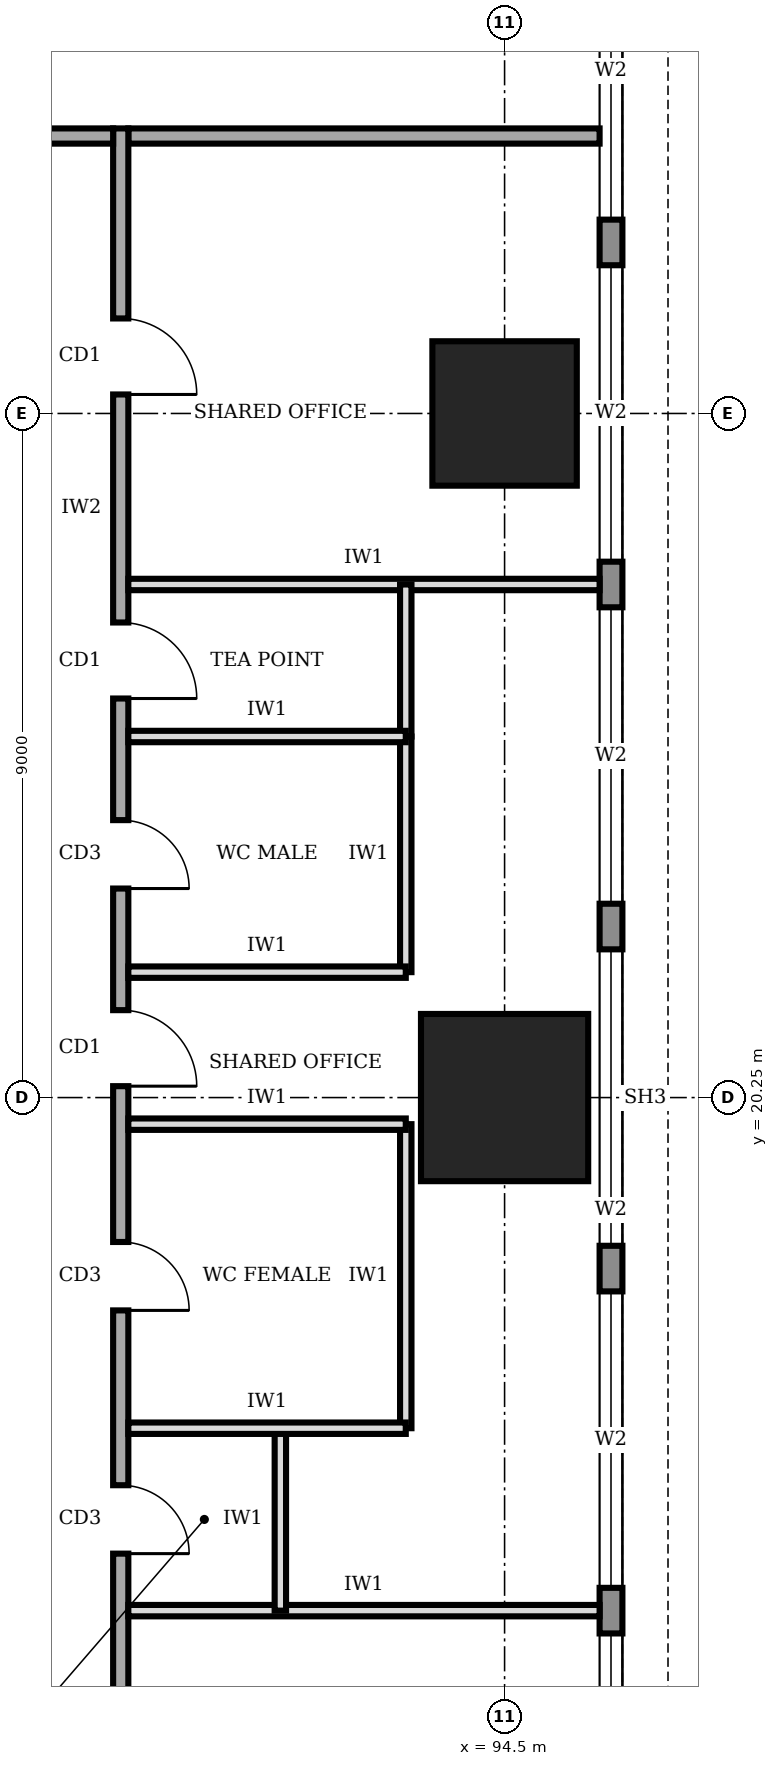
"""IFC4 building model, lengths in metres.
Left out: names, types, materials, properties, quantities, classifications, styles, units other than length and angle.
Written with IfcOpenShell. Run it as: python <this file> out.ifc"""

import sys

from ifc_helpers import new_model, si_unit, direction, frame, frame_2d, origin, origin_2d, place, context, subcontext, project, spatial, rectangle, extrude, element, fill, save


model = new_model("IFC4")
c1 = context("Model", 3, precision=1e-05, world=origin(), true_north=direction((0.0, 1.0)))
c2 = subcontext(c1, "Body", "Model", "MODEL_VIEW")
j1 = project(units=[si_unit("LENGTHUNIT", "METRE"), si_unit("PLANEANGLEUNIT", "RADIAN")], contexts=[c1])
p1 = place(None, origin())
s1 = spatial("IfcSite", under=j1, at=p1, CompositionType="ELEMENT")
p2 = place(p1, origin())
s2 = spatial("IfcBuilding", under=s1, at=p2, CompositionType="ELEMENT")
p3 = place(p2, frame((0.0, 0.0, 137.0)))
s3 = spatial("IfcBuildingStorey", under=s2, at=p3, CompositionType="ELEMENT", Elevation=137.0)
p4 = place(p3, frame((94.5, 20.25, 0.0), z_axis=(0.0, 0.0, 1.0), x_axis=(1.0, 0.0, 0.0)))
e1 = element("IfcColumn", 1, at=p4, inside=s3, PredefinedType="COLUMN", context=c2, shape_type="SweptSolid", body=[
    extrude(rectangle(XDim=2.2, YDim=2.2, at=origin_2d()), origin(), (0.0, 0.0, 1.0), 4.0),
])
p5 = place(p3, frame((94.5, 29.25, 0.0), z_axis=(0.0, 0.0, 1.0), x_axis=(1.0, 0.0, 0.0)))
e2 = element("IfcColumn", 2, at=p5, inside=s3, PredefinedType="COLUMN", context=c2, shape_type="SweptSolid", body=[
    extrude(rectangle(XDim=1.9, YDim=1.9, at=origin_2d()), origin(), (0.0, 0.0, 1.0), 4.0),
])
p6 = place(p3, frame((95.9, 3.32, 0.0), z_axis=(0.0, 0.0, 1.0), x_axis=(0.0, 1.0, 0.0)))
e3 = element("IfcWall", 3, at=p6, inside=s3, PredefinedType="STANDARD", context=c2, shape_type="SweptSolid", body=[
    extrude(rectangle(XDim=33.86, YDim=0.3, at=frame_2d((16.93, 0.0))), origin(), (0.0, 0.0, 1.0), 3.75),
])
p7 = place(p6, frame((1.48, 0.0, 0.6)))
e4 = element("IfcOpeningElement", 4, at=p7, cuts=e3, PredefinedType="OPENING", context=c2, shape_type="SweptSolid", body=[
    extrude(rectangle(XDim=3.9, YDim=2.6, at=frame_2d((1.95, 1.3))), frame((0.0, 0.16, 0.0), z_axis=(0.0, -1.0, 0.0), x_axis=(1.0, 0.0, 0.0)), (0.0, 0.0, 1.0), 0.32),
])
p8 = place(p6, frame((5.98, 0.0, 0.6)))
e5 = element("IfcOpeningElement", 5, at=p8, cuts=e3, PredefinedType="OPENING", context=c2, shape_type="SweptSolid", body=[
    extrude(rectangle(XDim=3.9, YDim=2.6, at=frame_2d((1.95, 1.3))), frame((0.0, 0.16, 0.0), z_axis=(0.0, -1.0, 0.0), x_axis=(1.0, 0.0, 0.0)), (0.0, 0.0, 1.0), 0.32),
])
p9 = place(p6, frame((10.48, 0.0, 0.6)))
e6 = element("IfcOpeningElement", 6, at=p9, cuts=e3, PredefinedType="OPENING", context=c2, shape_type="SweptSolid", body=[
    extrude(rectangle(XDim=3.9, YDim=2.6, at=frame_2d((1.95, 1.3))), frame((0.0, 0.16, 0.0), z_axis=(0.0, -1.0, 0.0), x_axis=(1.0, 0.0, 0.0)), (0.0, 0.0, 1.0), 0.32),
])
p10 = place(p6, frame((14.98, 0.0, 0.6)))
e7 = element("IfcOpeningElement", 7, at=p10, cuts=e3, PredefinedType="OPENING", context=c2, shape_type="SweptSolid", body=[
    extrude(rectangle(XDim=3.9, YDim=2.6, at=frame_2d((1.95, 1.3))), frame((0.0, 0.16, 0.0), z_axis=(0.0, -1.0, 0.0), x_axis=(1.0, 0.0, 0.0)), (0.0, 0.0, 1.0), 0.32),
])
p11 = place(p6, frame((19.48, 0.0, 0.6)))
e8 = element("IfcOpeningElement", 8, at=p11, cuts=e3, PredefinedType="OPENING", context=c2, shape_type="SweptSolid", body=[
    extrude(rectangle(XDim=3.9, YDim=2.6, at=frame_2d((1.95, 1.3))), frame((0.0, 0.16, 0.0), z_axis=(0.0, -1.0, 0.0), x_axis=(1.0, 0.0, 0.0)), (0.0, 0.0, 1.0), 0.32),
])
p12 = place(p6, frame((23.98, 0.0, 0.6)))
e9 = element("IfcOpeningElement", 9, at=p12, cuts=e3, PredefinedType="OPENING", context=c2, shape_type="SweptSolid", body=[
    extrude(rectangle(XDim=3.9, YDim=2.6, at=frame_2d((1.95, 1.3))), frame((0.0, 0.16, 0.0), z_axis=(0.0, -1.0, 0.0), x_axis=(1.0, 0.0, 0.0)), (0.0, 0.0, 1.0), 0.32),
])
p13 = place(p6, frame((28.48, 0.0, 0.6)))
e10 = element("IfcOpeningElement", 10, at=p13, cuts=e3, PredefinedType="OPENING", context=c2, shape_type="SweptSolid", body=[
    extrude(rectangle(XDim=3.9, YDim=2.6, at=frame_2d((1.95, 1.3))), frame((0.0, 0.16, 0.0), z_axis=(0.0, -1.0, 0.0), x_axis=(1.0, 0.0, 0.0)), (0.0, 0.0, 1.0), 0.32),
])
p14 = place(p3, frame((89.45, 9.2, 0.0), z_axis=(0.0, 0.0, 1.0), x_axis=(0.0, 1.0, 0.0)))
e11 = element("IfcWall", 11, at=p14, inside=s3, PredefinedType="SOLIDWALL", context=c2, shape_type="SweptSolid", body=[
    extrude(rectangle(XDim=23.8, YDim=0.2, at=frame_2d((11.9, 0.0))), origin(), (0.0, 0.0, 1.0), 3.75),
])
p15 = place(p14, frame((1.55, 0.0, 0.0)))
e12 = element("IfcOpeningElement", 12, at=p15, cuts=e11, PredefinedType="OPENING", context=c2, shape_type="SweptSolid", body=[
    extrude(rectangle(XDim=1.0, YDim=2.1, at=frame_2d((0.5, 1.05))), frame((0.0, 0.11, 0.0), z_axis=(0.0, -1.0, 0.0), x_axis=(1.0, 0.0, 0.0)), (0.0, 0.0, 1.0), 0.22),
])
p16 = place(p14, frame((5.05, 0.0, 0.0)))
e13 = element("IfcOpeningElement", 13, at=p16, cuts=e11, PredefinedType="OPENING", context=c2, shape_type="SweptSolid", body=[
    extrude(rectangle(XDim=0.9, YDim=2.1, at=frame_2d((0.45, 1.05))), frame((0.0, 0.11, 0.0), z_axis=(0.0, -1.0, 0.0), x_axis=(1.0, 0.0, 0.0)), (0.0, 0.0, 1.0), 0.22),
])
p17 = place(p14, frame((8.25, 0.0, 0.0)))
e14 = element("IfcOpeningElement", 14, at=p17, cuts=e11, PredefinedType="OPENING", context=c2, shape_type="SweptSolid", body=[
    extrude(rectangle(XDim=0.9, YDim=2.1, at=frame_2d((0.45, 1.05))), frame((0.0, 0.11, 0.0), z_axis=(0.0, -1.0, 0.0), x_axis=(1.0, 0.0, 0.0)), (0.0, 0.0, 1.0), 0.22),
])
p18 = place(p14, frame((13.8, 0.0, 0.0)))
e15 = element("IfcOpeningElement", 15, at=p18, cuts=e11, PredefinedType="OPENING", context=c2, shape_type="SweptSolid", body=[
    extrude(rectangle(XDim=0.9, YDim=2.1, at=frame_2d((0.45, 1.05))), frame((0.0, 0.11, 0.0), z_axis=(0.0, -1.0, 0.0), x_axis=(1.0, 0.0, 0.0)), (0.0, 0.0, 1.0), 0.22),
])
p19 = place(p14, frame((16.3, 0.0, 0.0)))
e16 = element("IfcOpeningElement", 16, at=p19, cuts=e11, PredefinedType="OPENING", context=c2, shape_type="SweptSolid", body=[
    extrude(rectangle(XDim=1.0, YDim=2.1, at=frame_2d((0.5, 1.05))), frame((0.0, 0.11, 0.0), z_axis=(0.0, -1.0, 0.0), x_axis=(1.0, 0.0, 0.0)), (0.0, 0.0, 1.0), 0.22),
])
p20 = place(p14, frame((11.2, 0.0, 0.0)))
e17 = element("IfcOpeningElement", 17, at=p20, cuts=e11, PredefinedType="OPENING", context=c2, shape_type="SweptSolid", body=[
    extrude(rectangle(XDim=1.0, YDim=2.1, at=frame_2d((0.5, 1.05))), frame((0.0, 0.11, 0.0), z_axis=(0.0, -1.0, 0.0), x_axis=(1.0, 0.0, 0.0)), (0.0, 0.0, 1.0), 0.22),
])
p21 = place(p14, frame((20.3, 0.0, 0.0)))
e18 = element("IfcOpeningElement", 18, at=p21, cuts=e11, PredefinedType="OPENING", context=c2, shape_type="SweptSolid", body=[
    extrude(rectangle(XDim=1.0, YDim=2.1, at=frame_2d((0.5, 1.05))), frame((0.0, 0.11, 0.0), z_axis=(0.0, -1.0, 0.0), x_axis=(1.0, 0.0, 0.0)), (0.0, 0.0, 1.0), 0.22),
])
p22 = place(p3, frame((89.35, 32.9, 0.0), z_axis=(0.0, 0.0, 1.0), x_axis=(-1.0, 0.0, 0.0)))
e19 = element("IfcWall", 19, at=p22, inside=s3, PredefinedType="SOLIDWALL", context=c2, shape_type="SweptSolid", body=[
    extrude(rectangle(XDim=18.4, YDim=0.2, at=frame_2d((9.2, 0.0))), origin(), (0.0, 0.0, 1.0), 3.75),
])
p23 = place(p22, frame((10.225, 0.0, 0.0)))
e20 = element("IfcOpeningElement", 20, at=p23, cuts=e19, PredefinedType="OPENING", context=c2, shape_type="SweptSolid", body=[
    extrude(rectangle(XDim=1.8, YDim=2.1, at=frame_2d((0.9, 1.05))), frame((0.0, 0.11, 0.0), z_axis=(0.0, -1.0, 0.0), x_axis=(1.0, 0.0, 0.0)), (0.0, 0.0, 1.0), 0.22),
])
p24 = place(p22, frame((1.325, 0.0, 0.0)))
e21 = element("IfcOpeningElement", 21, at=p24, cuts=e19, PredefinedType="OPENING", context=c2, shape_type="SweptSolid", body=[
    extrude(rectangle(XDim=1.0, YDim=2.1, at=frame_2d((0.5, 1.05))), frame((0.0, 0.11, 0.0), z_axis=(0.0, -1.0, 0.0), x_axis=(1.0, 0.0, 0.0)), (0.0, 0.0, 1.0), 0.22),
])
p25 = place(p3, frame((89.55, 32.9, 0.0), z_axis=(0.0, 0.0, 1.0), x_axis=(1.0, 0.0, 0.0)))
e22 = element("IfcWall", 22, at=p25, inside=s3, PredefinedType="SOLIDWALL", context=c2, shape_type="SweptSolid", body=[
    extrude(rectangle(XDim=6.2, YDim=0.2, at=frame_2d((3.1, 0.0))), origin(), (0.0, 0.0, 1.0), 3.75),
])
for number, where, z_axis, x_axis in (
    (23, (89.55, 13.5, 0.0), (0.0, 0.0, 1.0), (1.0, 0.0, 0.0)),
    (24, (89.55, 27.0, 0.0), (0.0, 0.0, 1.0), (1.0, 0.0, 0.0)),
):
    element("IfcWall", number, at=place(p3, frame(where, z_axis=z_axis, x_axis=x_axis)), inside=s3, PredefinedType="PARTITIONING", context=c2, shape_type="SweptSolid", body=[
        extrude(rectangle(XDim=6.2, YDim=0.15, at=frame_2d((3.1, 0.0))), origin(), (0.0, 0.0, 1.0), 3.75),
    ])
p26 = place(p3, frame((89.55, 15.9, 0.0), z_axis=(0.0, 0.0, 1.0), x_axis=(1.0, 0.0, 0.0)))
e25 = element("IfcWall", 25, at=p26, inside=s3, PredefinedType="PARTITIONING", context=c2, shape_type="SweptSolid", body=[
    extrude(rectangle(XDim=3.65, YDim=0.15, at=frame_2d((1.825, 0.0))), origin(), (0.0, 0.0, 1.0), 3.75),
])
p27 = place(p3, frame((89.55, 19.9, 0.0), z_axis=(0.0, 0.0, 1.0), x_axis=(1.0, 0.0, 0.0)))
e26 = element("IfcWall", 26, at=p27, inside=s3, PredefinedType="PARTITIONING", context=c2, shape_type="SweptSolid", body=[
    extrude(rectangle(XDim=3.65, YDim=0.15, at=frame_2d((1.825, 0.0))), origin(), (0.0, 0.0, 1.0), 2.85),
])
for number, where, z_axis, x_axis in (
    (27, (89.55, 21.9, 0.0), (0.0, 0.0, 1.0), (1.0, 0.0, 0.0)),
    (28, (89.55, 25.0, 0.0), (0.0, 0.0, 1.0), (1.0, 0.0, 0.0)),
):
    element("IfcWall", number, at=place(p3, frame(where, z_axis=z_axis, x_axis=x_axis)), inside=s3, PredefinedType="PARTITIONING", context=c2, shape_type="SweptSolid", body=[
        extrude(rectangle(XDim=3.65, YDim=0.15, at=frame_2d((1.825, 0.0))), origin(), (0.0, 0.0, 1.0), 3.75),
    ])
p28 = place(p3, frame((91.55, 13.5, 0.0), z_axis=(0.0, 0.0, 1.0), x_axis=(0.0, 1.0, 0.0)))
e29 = element("IfcWall", 29, at=p28, inside=s3, PredefinedType="PARTITIONING", context=c2, shape_type="SweptSolid", body=[
    extrude(rectangle(XDim=2.4, YDim=0.15, at=frame_2d((1.2, 0.0))), origin(), (0.0, 0.0, 1.0), 3.75),
])
p29 = place(p3, frame((93.2, 15.9, 0.0), z_axis=(0.0, 0.0, 1.0), x_axis=(0.0, 1.0, 0.0)))
e30 = element("IfcWall", 30, at=p29, inside=s3, PredefinedType="PARTITIONING", context=c2, shape_type="SweptSolid", body=[
    extrude(rectangle(XDim=4.0, YDim=0.15, at=frame_2d((2.0, 0.0))), origin(), (0.0, 0.0, 1.0), 3.75),
])
p30 = place(p3, frame((93.2, 21.9, 0.0), z_axis=(0.0, 0.0, 1.0), x_axis=(0.0, 1.0, 0.0)))
e31 = element("IfcWall", 31, at=p30, inside=s3, PredefinedType="PARTITIONING", context=c2, shape_type="SweptSolid", body=[
    extrude(rectangle(XDim=3.1, YDim=0.15, at=frame_2d((1.55, 0.0))), origin(), (0.0, 0.0, 1.0), 3.75),
])
p31 = place(p3, frame((93.2, 25.0, 0.0), z_axis=(0.0, 0.0, 1.0), x_axis=(0.0, 1.0, 0.0)))
e32 = element("IfcWall", 32, at=p31, inside=s3, PredefinedType="PARTITIONING", context=c2, shape_type="SweptSolid", body=[
    extrude(rectangle(XDim=2.0, YDim=0.15, at=frame_2d((1.0, 0.0))), origin(), (0.0, 0.0, 1.0), 3.75),
])
p32 = place(p8, origin())
e33 = element("IfcWindow", 33, at=p32, inside=s3, PartitioningType="SINGLE_PANEL", PredefinedType="WINDOW", context=c2, shape_type="SweptSolid", body=[
    extrude(rectangle(XDim=3.9, YDim=2.6, at=frame_2d((1.95, 1.3))), frame((0.0, 0.03, 0.0), z_axis=(0.0, -1.0, 0.0), x_axis=(1.0, 0.0, 0.0)), (0.0, 0.0, 1.0), 0.06),
])
fill(e5, e33)
p33 = place(p9, origin())
e34 = element("IfcWindow", 34, at=p33, inside=s3, PartitioningType="SINGLE_PANEL", PredefinedType="WINDOW", context=c2, shape_type="SweptSolid", body=[
    extrude(rectangle(XDim=3.9, YDim=2.6, at=frame_2d((1.95, 1.3))), frame((0.0, 0.03, 0.0), z_axis=(0.0, -1.0, 0.0), x_axis=(1.0, 0.0, 0.0)), (0.0, 0.0, 1.0), 0.06),
])
fill(e6, e34)
p34 = place(p10, origin())
e35 = element("IfcWindow", 35, at=p34, inside=s3, PartitioningType="SINGLE_PANEL", PredefinedType="WINDOW", context=c2, shape_type="SweptSolid", body=[
    extrude(rectangle(XDim=3.9, YDim=2.6, at=frame_2d((1.95, 1.3))), frame((0.0, 0.03, 0.0), z_axis=(0.0, -1.0, 0.0), x_axis=(1.0, 0.0, 0.0)), (0.0, 0.0, 1.0), 0.06),
])
fill(e7, e35)
p35 = place(p11, origin())
e36 = element("IfcWindow", 36, at=p35, inside=s3, PartitioningType="SINGLE_PANEL", PredefinedType="WINDOW", context=c2, shape_type="SweptSolid", body=[
    extrude(rectangle(XDim=3.9, YDim=2.6, at=frame_2d((1.95, 1.3))), frame((0.0, 0.03, 0.0), z_axis=(0.0, -1.0, 0.0), x_axis=(1.0, 0.0, 0.0)), (0.0, 0.0, 1.0), 0.06),
])
fill(e8, e36)
p36 = place(p12, origin())
e37 = element("IfcWindow", 37, at=p36, inside=s3, PartitioningType="SINGLE_PANEL", PredefinedType="WINDOW", context=c2, shape_type="SweptSolid", body=[
    extrude(rectangle(XDim=3.9, YDim=2.6, at=frame_2d((1.95, 1.3))), frame((0.0, 0.03, 0.0), z_axis=(0.0, -1.0, 0.0), x_axis=(1.0, 0.0, 0.0)), (0.0, 0.0, 1.0), 0.06),
])
fill(e9, e37)
p37 = place(p13, origin())
e38 = element("IfcWindow", 38, at=p37, inside=s3, PartitioningType="SINGLE_PANEL", PredefinedType="WINDOW", context=c2, shape_type="SweptSolid", body=[
    extrude(rectangle(XDim=3.9, YDim=2.6, at=frame_2d((1.95, 1.3))), frame((0.0, 0.03, 0.0), z_axis=(0.0, -1.0, 0.0), x_axis=(1.0, 0.0, 0.0)), (0.0, 0.0, 1.0), 0.06),
])
fill(e10, e38)
p38 = place(p16, frame((0.9, 0.0, 0.0), z_axis=(0.0, 0.0, 1.0), x_axis=(-1.0, 0.0, 0.0)))
e39 = element("IfcDoor", 39, at=p38, inside=s3, OperationType="SINGLE_SWING_RIGHT", PredefinedType="DOOR", context=c2, shape_type="SweptSolid", body=[
    extrude(rectangle(XDim=0.9, YDim=2.1, at=frame_2d((0.45, 1.05))), frame((0.0, 0.025, 0.0), z_axis=(0.0, -1.0, 0.0), x_axis=(1.0, 0.0, 0.0)), (0.0, 0.0, 1.0), 0.05),
])
fill(e13, e39)
p39 = place(p17, frame((0.9, 0.0, 0.0), z_axis=(0.0, 0.0, 1.0), x_axis=(-1.0, 0.0, 0.0)))
e40 = element("IfcDoor", 40, at=p39, inside=s3, OperationType="SINGLE_SWING_RIGHT", PredefinedType="DOOR", context=c2, shape_type="SweptSolid", body=[
    extrude(rectangle(XDim=0.9, YDim=2.1, at=frame_2d((0.45, 1.05))), frame((0.0, 0.025, 0.0), z_axis=(0.0, -1.0, 0.0), x_axis=(1.0, 0.0, 0.0)), (0.0, 0.0, 1.0), 0.05),
])
fill(e14, e40)
p40 = place(p18, frame((0.9, 0.0, 0.0), z_axis=(0.0, 0.0, 1.0), x_axis=(-1.0, 0.0, 0.0)))
e41 = element("IfcDoor", 41, at=p40, inside=s3, OperationType="SINGLE_SWING_RIGHT", PredefinedType="DOOR", context=c2, shape_type="SweptSolid", body=[
    extrude(rectangle(XDim=0.9, YDim=2.1, at=frame_2d((0.45, 1.05))), frame((0.0, 0.025, 0.0), z_axis=(0.0, -1.0, 0.0), x_axis=(1.0, 0.0, 0.0)), (0.0, 0.0, 1.0), 0.05),
])
fill(e15, e41)
p41 = place(p19, frame((1.0, 0.0, 0.0), z_axis=(0.0, 0.0, 1.0), x_axis=(-1.0, 0.0, 0.0)))
e42 = element("IfcDoor", 42, at=p41, inside=s3, OperationType="SINGLE_SWING_RIGHT", PredefinedType="DOOR", context=c2, shape_type="SweptSolid", body=[
    extrude(rectangle(XDim=1.0, YDim=2.1, at=frame_2d((0.5, 1.05))), frame((0.0, 0.025, 0.0), z_axis=(0.0, -1.0, 0.0), x_axis=(1.0, 0.0, 0.0)), (0.0, 0.0, 1.0), 0.05),
])
fill(e16, e42)
p42 = place(p20, frame((1.0, 0.0, 0.0), z_axis=(0.0, 0.0, 1.0), x_axis=(-1.0, 0.0, 0.0)))
e43 = element("IfcDoor", 43, at=p42, inside=s3, OperationType="SINGLE_SWING_RIGHT", PredefinedType="DOOR", context=c2, shape_type="SweptSolid", body=[
    extrude(rectangle(XDim=1.0, YDim=2.1, at=frame_2d((0.5, 1.05))), frame((0.0, 0.025, 0.0), z_axis=(0.0, -1.0, 0.0), x_axis=(1.0, 0.0, 0.0)), (0.0, 0.0, 1.0), 0.05),
])
fill(e17, e43)
p43 = place(p21, frame((1.0, 0.0, 0.0), z_axis=(0.0, 0.0, 1.0), x_axis=(-1.0, 0.0, 0.0)))
e44 = element("IfcDoor", 44, at=p43, inside=s3, OperationType="SINGLE_SWING_RIGHT", PredefinedType="DOOR", context=c2, shape_type="SweptSolid", body=[
    extrude(rectangle(XDim=1.0, YDim=2.1, at=frame_2d((0.5, 1.05))), frame((0.0, 0.025, 0.0), z_axis=(0.0, -1.0, 0.0), x_axis=(1.0, 0.0, 0.0)), (0.0, 0.0, 1.0), 0.05),
])
fill(e18, e44)
save(model, sys.argv[1])
